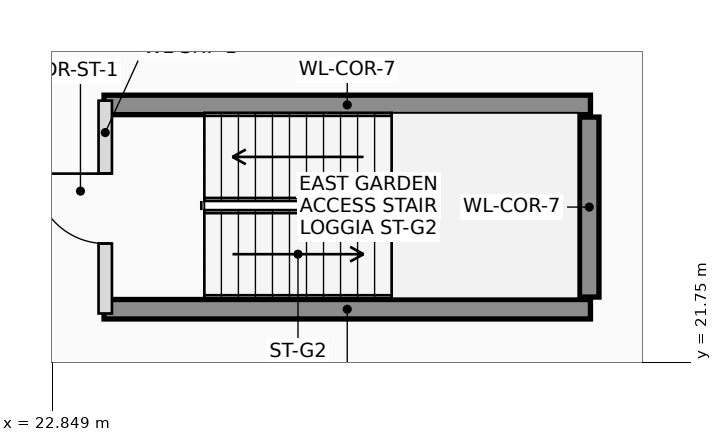
"""IFC4 building model, lengths in metres.
Left out: names, types, materials, properties, quantities, classifications, styles, units other than length and angle.
Written with IfcOpenShell. Run it as: python <this file> out.ifc"""

import sys

from ifc_helpers import new_model, si_unit, direction, frame, frame_2d, origin, place, context, subcontext, project, spatial, rectangle, extrude, element, fill, save


model = new_model("IFC4")
c1 = context("Model", 3, precision=1e-05, world=origin(), true_north=direction((0.0, 1.0)))
c2 = subcontext(c1, "Body", "Model", "MODEL_VIEW")
j1 = project(units=[si_unit("LENGTHUNIT", "METRE"), si_unit("PLANEANGLEUNIT", "RADIAN")], contexts=[c1])
p1 = place(None, origin())
s1 = spatial("IfcSite", under=j1, at=p1, CompositionType="ELEMENT")
p2 = place(p1, origin())
s2 = spatial("IfcBuilding", under=s1, at=p2, CompositionType="ELEMENT")
p3 = place(p2, frame((0.0, 0.0, 4.5)))
s3 = spatial("IfcBuildingStorey", under=s2, at=p3, CompositionType="ELEMENT", Elevation=4.5)
for number, where, z_axis, x_axis in (
    (1, (23.7, 25.98, 0.0), (0.0, 0.0, 1.0), (1.0, 0.0, 0.0)),
    (2, (23.7, 22.62, 0.0), (0.0, 0.0, 1.0), (1.0, 0.0, 0.0)),
):
    element("IfcWall", number, at=place(p3, frame(where, z_axis=z_axis, x_axis=x_axis)), inside=s3, PredefinedType="SHEAR", context=c2, shape_type="SweptSolid", body=[
        extrude(rectangle(XDim=8.0, YDim=0.32, at=frame_2d((4.0, 0.0))), origin(), (0.0, 0.0, 1.0), 3.9),
    ])
p4 = place(p3, frame((31.68, 22.82, 0.0), z_axis=(0.0, 0.0, 1.0), x_axis=(0.0, 1.0, 0.0)))
e3 = element("IfcWall", 3, at=p4, inside=s3, PredefinedType="SHEAR", context=c2, shape_type="SweptSolid", body=[
    extrude(rectangle(XDim=2.96, YDim=0.32, at=frame_2d((1.48, 0.0))), origin(), (0.0, 0.0, 1.0), 3.9),
])
p5 = place(p3, frame((23.72, 22.55, 0.0), z_axis=(0.0, 0.0, 1.0), x_axis=(0.0, 1.0, 0.0)))
e4 = element("IfcWall", 4, at=p5, inside=s3, PredefinedType="PLUMBINGWALL", context=c2, shape_type="SweptSolid", body=[
    extrude(rectangle(XDim=3.5, YDim=0.22, at=frame_2d((1.75, 0.0))), origin(), (0.0, 0.0, 1.0), 3.57),
])
p6 = place(p5, frame((1.15, 0.0, 0.0)))
e5 = element("IfcOpeningElement", 5, at=p6, cuts=e4, PredefinedType="OPENING", context=c2, shape_type="SweptSolid", body=[
    extrude(rectangle(XDim=1.15, YDim=2.15, at=frame_2d((0.575, 1.075))), frame((0.0, 0.12, 0.0), z_axis=(0.0, -1.0, 0.0), x_axis=(1.0, 0.0, 0.0)), (0.0, 0.0, 1.0), 0.24),
])
p7 = place(p6, origin())
e6 = element("IfcDoor", 6, at=p7, inside=s3, OperationType="SINGLE_SWING_RIGHT", PredefinedType="DOOR", context=c2, shape_type="SweptSolid", body=[
    extrude(rectangle(XDim=1.15, YDim=2.15, at=frame_2d((0.575, 1.075))), frame((0.0, 0.025, 0.0), z_axis=(0.0, -1.0, 0.0), x_axis=(1.0, 0.0, 0.0)), (0.0, 0.0, 1.0), 0.05),
])
fill(e5, e6)
save(model, sys.argv[1])
